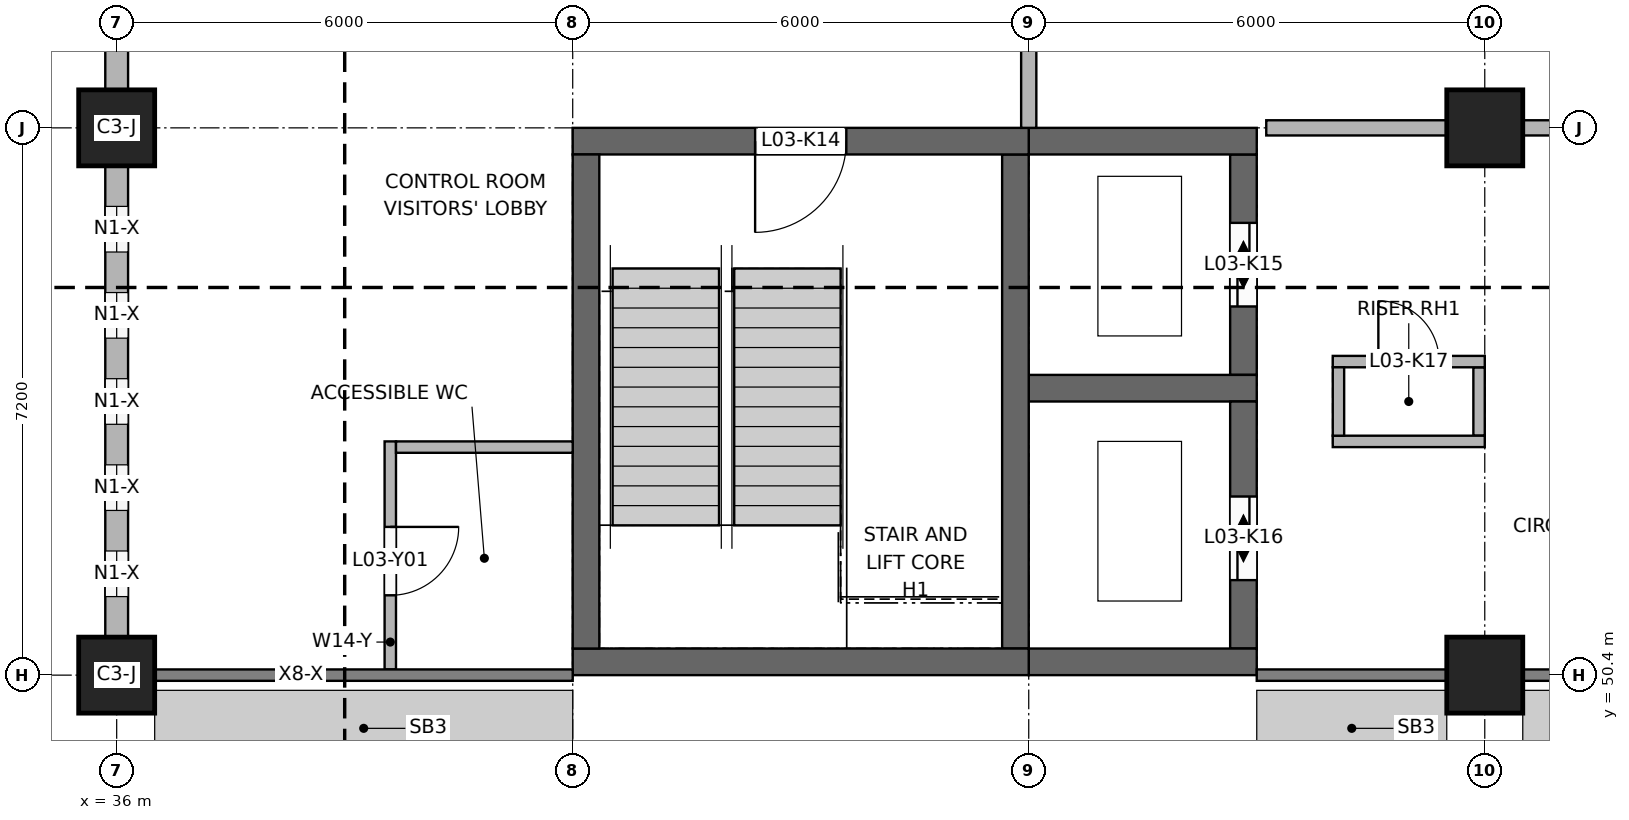
"""IFC4 building model, lengths in metres.
Left out: names, types, materials, properties, quantities, classifications, styles, units other than length and angle.
Written with IfcOpenShell. Run it as: python <this file> out.ifc"""

import sys

from ifc_helpers import new_model, si_unit, direction, frame, frame_2d, origin, origin_2d, place, context, subcontext, project, spatial, rectangle, extrude, element, fill, save


model = new_model("IFC4")
c1 = context("Model", 3, precision=1e-05, world=origin(), true_north=direction((0.0, 1.0)))
c2 = subcontext(c1, "Body", "Model", "MODEL_VIEW")
j1 = project(units=[si_unit("LENGTHUNIT", "METRE"), si_unit("PLANEANGLEUNIT", "RADIAN")], contexts=[c1])
p1 = place(None, origin())
s1 = spatial("IfcSite", under=j1, at=p1, CompositionType="ELEMENT")
p2 = place(p1, origin())
s2 = spatial("IfcBuilding", under=s1, at=p2, CompositionType="ELEMENT")
p3 = place(p2, frame((0.0, 0.0, 12.6)))
s3 = spatial("IfcBuildingStorey", under=s2, at=p3, CompositionType="ELEMENT", Elevation=12.6)
p4 = place(p3, frame((42.0, 50.575, 0.0), z_axis=(0.0, 0.0, 1.0), x_axis=(1.0, 0.0, 0.0)))
e1 = element("IfcWall", 1, at=p4, inside=s3, PredefinedType="SHEAR", context=c2, shape_type="SweptSolid", body=[
    extrude(rectangle(XDim=6.0, YDim=0.35, at=frame_2d((3.0, 0.0))), origin(), (0.0, 0.0, 1.0), 4.0),
])
p5 = place(p3, frame((42.0, 57.425, 0.0), z_axis=(0.0, 0.0, 1.0), x_axis=(1.0, 0.0, 0.0)))
e2 = element("IfcWall", 2, at=p5, inside=s3, PredefinedType="SHEAR", context=c2, shape_type="SweptSolid", body=[
    extrude(rectangle(XDim=6.0, YDim=0.35, at=frame_2d((3.0, 0.0))), origin(), (0.0, 0.0, 1.0), 4.0),
])
p6 = place(p5, frame((2.4, 0.0, 0.0)))
e3 = element("IfcOpeningElement", 3, at=p6, cuts=e2, PredefinedType="OPENING", context=c2, shape_type="SweptSolid", body=[
    extrude(rectangle(XDim=1.2, YDim=2.1, at=frame_2d((0.6, 1.05))), frame((0.0, 0.185, 0.0), z_axis=(0.0, -1.0, 0.0), x_axis=(1.0, 0.0, 0.0)), (0.0, 0.0, 1.0), 0.37),
])
for number, where, z_axis, x_axis in (
    (4, (42.175, 50.75, 0.0), (0.0, 0.0, 1.0), (0.0, 1.0, 0.0)),
    (5, (47.825, 50.75, 0.0), (0.0, 0.0, 1.0), (0.0, 1.0, 0.0)),
):
    element("IfcWall", number, at=place(p3, frame(where, z_axis=z_axis, x_axis=x_axis)), inside=s3, PredefinedType="SHEAR", context=c2, shape_type="SweptSolid", body=[
        extrude(rectangle(XDim=6.5, YDim=0.35, at=frame_2d((3.25, 0.0))), origin(), (0.0, 0.0, 1.0), 4.0),
    ])
for number, where, z_axis, x_axis in (
    (6, (48.0, 54.175, 0.0), (0.0, 0.0, 1.0), (1.0, 0.0, 0.0)),
    (7, (48.0, 57.425, 0.0), (0.0, 0.0, 1.0), (1.0, 0.0, 0.0)),
):
    element("IfcWall", number, at=place(p3, frame(where, z_axis=z_axis, x_axis=x_axis)), inside=s3, PredefinedType="SHEAR", context=c2, shape_type="SweptSolid", body=[
        extrude(rectangle(XDim=3.0, YDim=0.35, at=frame_2d((1.5, 0.0))), origin(), (0.0, 0.0, 1.0), 4.2),
    ])
p7 = place(p3, frame((50.825, 54.35, 0.0), z_axis=(0.0, 0.0, 1.0), x_axis=(0.0, 1.0, 0.0)))
e8 = element("IfcWall", 8, at=p7, inside=s3, PredefinedType="SHEAR", context=c2, shape_type="SweptSolid", body=[
    extrude(rectangle(XDim=2.9, YDim=0.35, at=frame_2d((1.45, 0.0))), origin(), (0.0, 0.0, 1.0), 4.2),
])
p8 = place(p7, frame((0.9, 0.0, 0.0)))
e9 = element("IfcOpeningElement", 9, at=p8, cuts=e8, PredefinedType="OPENING", context=c2, shape_type="SweptSolid", body=[
    extrude(rectangle(XDim=1.1, YDim=2.1, at=frame_2d((0.55, 1.05))), frame((0.0, 0.185, 0.0), z_axis=(0.0, -1.0, 0.0), x_axis=(1.0, 0.0, 0.0)), (0.0, 0.0, 1.0), 0.37),
])
p9 = place(p3, frame((48.0, 50.575, 0.0), z_axis=(0.0, 0.0, 1.0), x_axis=(1.0, 0.0, 0.0)))
e10 = element("IfcWall", 10, at=p9, inside=s3, PredefinedType="SHEAR", context=c2, shape_type="SweptSolid", body=[
    extrude(rectangle(XDim=3.0, YDim=0.35, at=frame_2d((1.5, 0.0))), origin(), (0.0, 0.0, 1.0), 4.2),
])
p10 = place(p3, frame((50.825, 50.75, 0.0), z_axis=(0.0, 0.0, 1.0), x_axis=(0.0, 1.0, 0.0)))
e11 = element("IfcWall", 11, at=p10, inside=s3, PredefinedType="SHEAR", context=c2, shape_type="SweptSolid", body=[
    extrude(rectangle(XDim=3.25, YDim=0.35, at=frame_2d((1.625, 0.0))), origin(), (0.0, 0.0, 1.0), 4.2),
])
p11 = place(p10, frame((0.9, 0.0, 0.0)))
e12 = element("IfcOpeningElement", 12, at=p11, cuts=e11, PredefinedType="OPENING", context=c2, shape_type="SweptSolid", body=[
    extrude(rectangle(XDim=1.1, YDim=2.1, at=frame_2d((0.55, 1.05))), frame((0.0, 0.185, 0.0), z_axis=(0.0, -1.0, 0.0), x_axis=(1.0, 0.0, 0.0)), (0.0, 0.0, 1.0), 0.37),
])
p12 = place(p3, frame((52.0, 53.475, 0.0), z_axis=(0.0, 0.0, 1.0), x_axis=(1.0, 0.0, 0.0)))
e13 = element("IfcWall", 13, at=p12, inside=s3, PredefinedType="SOLIDWALL", context=c2, shape_type="SweptSolid", body=[
    extrude(rectangle(XDim=2.0, YDim=0.15, at=frame_2d((1.0, 0.0))), origin(), (0.0, 0.0, 1.0), 4.2),
])
p13 = place(p3, frame((52.0, 54.525, 0.0), z_axis=(0.0, 0.0, 1.0), x_axis=(1.0, 0.0, 0.0)))
e14 = element("IfcWall", 14, at=p13, inside=s3, PredefinedType="SOLIDWALL", context=c2, shape_type="SweptSolid", body=[
    extrude(rectangle(XDim=2.0, YDim=0.15, at=frame_2d((1.0, 0.0))), origin(), (0.0, 0.0, 1.0), 4.2),
])
p14 = place(p13, frame((0.6, 0.0, 0.0)))
e15 = element("IfcOpeningElement", 15, at=p14, cuts=e14, PredefinedType="OPENING", context=c2, shape_type="SweptSolid", body=[
    extrude(rectangle(XDim=0.8, YDim=2.1, at=frame_2d((0.4, 1.05))), frame((0.0, 0.085, 0.0), z_axis=(0.0, -1.0, 0.0), x_axis=(1.0, 0.0, 0.0)), (0.0, 0.0, 1.0), 0.17),
])
p15 = place(p3, frame((52.075, 53.55, 0.0), z_axis=(0.0, 0.0, 1.0), x_axis=(0.0, 1.0, 0.0)))
e16 = element("IfcWall", 16, at=p15, inside=s3, PredefinedType="SOLIDWALL", context=c2, shape_type="SweptSolid", body=[
    extrude(rectangle(XDim=0.9, YDim=0.15, at=frame_2d((0.45, 0.0))), origin(), (0.0, 0.0, 1.0), 4.2),
])
p16 = place(p3, frame((53.925, 53.55, 0.0), z_axis=(0.0, 0.0, 1.0), x_axis=(0.0, 1.0, 0.0)))
e17 = element("IfcWall", 17, at=p16, inside=s3, PredefinedType="SOLIDWALL", context=c2, shape_type="SweptSolid", body=[
    extrude(rectangle(XDim=0.9, YDim=0.15, at=frame_2d((0.45, 0.0))), origin(), (0.0, 0.0, 1.0), 3.1),
])
for number, where, z_axis, x_axis in (
    (18, (36.0, 50.4, 0.0), (0.0, 0.0, 1.0), (1.0, 0.0, 0.0)),
    (19, (54.0, 50.4, 0.0), (0.0, 0.0, 1.0), (1.0, 0.0, 0.0)),
    (20, (36.0, 57.6, 0.0), (0.0, 0.0, 1.0), (1.0, 0.0, 0.0)),
    (21, (54.0, 57.6, 0.0), (0.0, 0.0, 1.0), (1.0, 0.0, 0.0)),
):
    element("IfcColumn", number, at=place(p3, frame(where, z_axis=z_axis, x_axis=x_axis)), inside=s3, PredefinedType="COLUMN", context=c2, shape_type="SweptSolid", body=[
        extrude(rectangle(XDim=1.0, YDim=1.0, at=origin_2d()), origin(), (0.0, 0.0, 1.0), 4.0),
    ])
p17 = place(p3, frame((36.0, 50.9, 0.0), z_axis=(0.0, 0.0, 1.0), x_axis=(0.0, 1.0, 0.0)))
e22 = element("IfcWall", 22, at=p17, inside=s3, PredefinedType="SOLIDWALL", context=c2, shape_type="SweptSolid", body=[
    extrude(rectangle(XDim=6.2, YDim=0.3, at=frame_2d((3.1, 0.0))), origin(), (0.0, 0.0, 1.0), 3.1),
])
p18 = place(p17, frame((0.533, 0.0, 0.9)))
e23 = element("IfcOpeningElement", 23, at=p18, cuts=e22, PredefinedType="OPENING", context=c2, shape_type="SweptSolid", body=[
    extrude(rectangle(XDim=0.6, YDim=1.9, at=frame_2d((0.3, 0.95))), frame((0.0, 0.16, 0.0), z_axis=(0.0, -1.0, 0.0), x_axis=(1.0, 0.0, 0.0)), (0.0, 0.0, 1.0), 0.32),
])
p19 = place(p17, frame((1.667, 0.0, 0.9)))
e24 = element("IfcOpeningElement", 24, at=p19, cuts=e22, PredefinedType="OPENING", context=c2, shape_type="SweptSolid", body=[
    extrude(rectangle(XDim=0.6, YDim=1.9, at=frame_2d((0.3, 0.95))), frame((0.0, 0.16, 0.0), z_axis=(0.0, -1.0, 0.0), x_axis=(1.0, 0.0, 0.0)), (0.0, 0.0, 1.0), 0.32),
])
p20 = place(p17, frame((2.8, 0.0, 0.9)))
e25 = element("IfcOpeningElement", 25, at=p20, cuts=e22, PredefinedType="OPENING", context=c2, shape_type="SweptSolid", body=[
    extrude(rectangle(XDim=0.6, YDim=1.9, at=frame_2d((0.3, 0.95))), frame((0.0, 0.16, 0.0), z_axis=(0.0, -1.0, 0.0), x_axis=(1.0, 0.0, 0.0)), (0.0, 0.0, 1.0), 0.32),
])
p21 = place(p17, frame((3.933, 0.0, 0.9)))
e26 = element("IfcOpeningElement", 26, at=p21, cuts=e22, PredefinedType="OPENING", context=c2, shape_type="SweptSolid", body=[
    extrude(rectangle(XDim=0.6, YDim=1.9, at=frame_2d((0.3, 0.95))), frame((0.0, 0.16, 0.0), z_axis=(0.0, -1.0, 0.0), x_axis=(1.0, 0.0, 0.0)), (0.0, 0.0, 1.0), 0.32),
])
p22 = place(p17, frame((5.067, 0.0, 0.9)))
e27 = element("IfcOpeningElement", 27, at=p22, cuts=e22, PredefinedType="OPENING", context=c2, shape_type="SweptSolid", body=[
    extrude(rectangle(XDim=0.6, YDim=1.9, at=frame_2d((0.3, 0.95))), frame((0.0, 0.16, 0.0), z_axis=(0.0, -1.0, 0.0), x_axis=(1.0, 0.0, 0.0)), (0.0, 0.0, 1.0), 0.32),
])
p23 = place(p3, frame((36.0, 58.1, 0.0), z_axis=(0.0, 0.0, 1.0), x_axis=(0.0, 1.0, 0.0)))
e28 = element("IfcWall", 28, at=p23, inside=s3, PredefinedType="SOLIDWALL", context=c2, shape_type="SweptSolid", body=[
    extrude(rectangle(XDim=6.2, YDim=0.3, at=frame_2d((3.1, 0.0))), origin(), (0.0, 0.0, 1.0), 3.1),
])
p24 = place(p23, frame((0.51, 0.0, 0.9)))
e29 = element("IfcOpeningElement", 29, at=p24, cuts=e28, PredefinedType="OPENING", context=c2, shape_type="SweptSolid", body=[
    extrude(rectangle(XDim=0.6, YDim=1.9, at=frame_2d((0.3, 0.95))), frame((0.0, 0.16, 0.0), z_axis=(0.0, -1.0, 0.0), x_axis=(1.0, 0.0, 0.0)), (0.0, 0.0, 1.0), 0.32),
])
p25 = place(p23, frame((2.735, 0.0, 0.9)))
e30 = element("IfcOpeningElement", 30, at=p25, cuts=e28, PredefinedType="OPENING", context=c2, shape_type="SweptSolid", body=[
    extrude(rectangle(XDim=0.6, YDim=1.9, at=frame_2d((0.3, 0.95))), frame((0.0, 0.16, 0.0), z_axis=(0.0, -1.0, 0.0), x_axis=(1.0, 0.0, 0.0)), (0.0, 0.0, 1.0), 0.32),
])
p26 = place(p23, frame((3.89, 0.0, 0.9)))
e31 = element("IfcOpeningElement", 31, at=p26, cuts=e28, PredefinedType="OPENING", context=c2, shape_type="SweptSolid", body=[
    extrude(rectangle(XDim=0.6, YDim=1.9, at=frame_2d((0.3, 0.95))), frame((0.0, 0.16, 0.0), z_axis=(0.0, -1.0, 0.0), x_axis=(1.0, 0.0, 0.0)), (0.0, 0.0, 1.0), 0.32),
])
p27 = place(p23, frame((5.045, 0.0, 0.9)))
e32 = element("IfcOpeningElement", 32, at=p27, cuts=e28, PredefinedType="OPENING", context=c2, shape_type="SweptSolid", body=[
    extrude(rectangle(XDim=0.6, YDim=1.9, at=frame_2d((0.3, 0.95))), frame((0.0, 0.16, 0.0), z_axis=(0.0, -1.0, 0.0), x_axis=(1.0, 0.0, 0.0)), (0.0, 0.0, 1.0), 0.32),
])
p28 = place(p3, frame((39.6, 50.475, 0.0), z_axis=(0.0, 0.0, 1.0), x_axis=(0.0, 1.0, 0.0)))
e33 = element("IfcWall", 33, at=p28, inside=s3, PredefinedType="PARTITIONING", context=c2, shape_type="SweptSolid", body=[
    extrude(rectangle(XDim=3.0, YDim=0.15, at=frame_2d((1.5, 0.0))), origin(), (0.0, 0.0, 1.0), 4.0),
])
p29 = place(p28, frame((0.975, 0.0, 0.0)))
e34 = element("IfcOpeningElement", 34, at=p29, cuts=e33, PredefinedType="OPENING", context=c2, shape_type="SweptSolid", body=[
    extrude(rectangle(XDim=0.9, YDim=2.1, at=frame_2d((0.45, 1.05))), frame((0.0, 0.085, 0.0), z_axis=(0.0, -1.0, 0.0), x_axis=(1.0, 0.0, 0.0)), (0.0, 0.0, 1.0), 0.17),
])
p30 = place(p3, frame((48.0, 57.6, 0.0), z_axis=(0.0, 0.0, 1.0), x_axis=(0.0, 1.0, 0.0)))
e35 = element("IfcWall", 35, at=p30, inside=s3, PredefinedType="PARTITIONING", context=c2, shape_type="SweptSolid", body=[
    extrude(rectangle(XDim=6.7, YDim=0.2, at=frame_2d((3.35, 0.0))), origin(), (0.0, 0.0, 1.0), 8.2),
])
p31 = place(p3, frame((39.675, 53.4, 0.0), z_axis=(0.0, 0.0, 1.0), x_axis=(1.0, 0.0, 0.0)))
e36 = element("IfcWall", 36, at=p31, inside=s3, PredefinedType="PARTITIONING", context=c2, shape_type="SweptSolid", body=[
    extrude(rectangle(XDim=2.325, YDim=0.15, at=frame_2d((1.163, 0.0))), origin(), (0.0, 0.0, 1.0), 4.0),
])
p32 = place(p3, frame((51.125, 57.6, 0.0), z_axis=(0.0, 0.0, 1.0), x_axis=(1.0, 0.0, 0.0)))
e37 = element("IfcWall", 37, at=p32, inside=s3, PredefinedType="PARTITIONING", context=c2, shape_type="SweptSolid", body=[
    extrude(rectangle(XDim=2.375, YDim=0.2, at=frame_2d((1.188, 0.0))), origin(), (0.0, 0.0, 1.0), 3.2),
])
p33 = place(p3, frame((54.5, 57.6, 0.0), z_axis=(0.0, 0.0, 1.0), x_axis=(1.0, 0.0, 0.0)))
e38 = element("IfcWall", 38, at=p33, inside=s3, PredefinedType="PARTITIONING", context=c2, shape_type="SweptSolid", body=[
    extrude(rectangle(XDim=5.0, YDim=0.2, at=frame_2d((2.5, 0.0))), origin(), (0.0, 0.0, 1.0), 3.2),
])
p34 = place(p33, frame((2.5, 0.0, 0.0)))
e39 = element("IfcOpeningElement", 39, at=p34, cuts=e38, PredefinedType="OPENING", context=c2, shape_type="SweptSolid", body=[
    extrude(rectangle(XDim=2.4, YDim=2.1, at=frame_2d((1.2, 1.05))), frame((0.0, 0.11, 0.0), z_axis=(0.0, -1.0, 0.0), x_axis=(1.0, 0.0, 0.0)), (0.0, 0.0, 1.0), 0.22),
])
p35 = place(p18, origin())
e40 = element("IfcWindow", 40, at=p35, inside=s3, PartitioningType="SINGLE_PANEL", PredefinedType="WINDOW", context=c2, shape_type="SweptSolid", body=[
    extrude(rectangle(XDim=0.6, YDim=1.9, at=frame_2d((0.3, 0.95))), frame((0.0, 0.03, 0.0), z_axis=(0.0, -1.0, 0.0), x_axis=(1.0, 0.0, 0.0)), (0.0, 0.0, 1.0), 0.06),
])
fill(e23, e40)
p36 = place(p19, origin())
e41 = element("IfcWindow", 41, at=p36, inside=s3, PartitioningType="SINGLE_PANEL", PredefinedType="WINDOW", context=c2, shape_type="SweptSolid", body=[
    extrude(rectangle(XDim=0.6, YDim=1.9, at=frame_2d((0.3, 0.95))), frame((0.0, 0.03, 0.0), z_axis=(0.0, -1.0, 0.0), x_axis=(1.0, 0.0, 0.0)), (0.0, 0.0, 1.0), 0.06),
])
fill(e24, e41)
p37 = place(p20, origin())
e42 = element("IfcWindow", 42, at=p37, inside=s3, PartitioningType="SINGLE_PANEL", PredefinedType="WINDOW", context=c2, shape_type="SweptSolid", body=[
    extrude(rectangle(XDim=0.6, YDim=1.9, at=frame_2d((0.3, 0.95))), frame((0.0, 0.03, 0.0), z_axis=(0.0, -1.0, 0.0), x_axis=(1.0, 0.0, 0.0)), (0.0, 0.0, 1.0), 0.06),
])
fill(e25, e42)
p38 = place(p21, origin())
e43 = element("IfcWindow", 43, at=p38, inside=s3, PartitioningType="SINGLE_PANEL", PredefinedType="WINDOW", context=c2, shape_type="SweptSolid", body=[
    extrude(rectangle(XDim=0.6, YDim=1.9, at=frame_2d((0.3, 0.95))), frame((0.0, 0.03, 0.0), z_axis=(0.0, -1.0, 0.0), x_axis=(1.0, 0.0, 0.0)), (0.0, 0.0, 1.0), 0.06),
])
fill(e26, e43)
p39 = place(p22, origin())
e44 = element("IfcWindow", 44, at=p39, inside=s3, PartitioningType="SINGLE_PANEL", PredefinedType="WINDOW", context=c2, shape_type="SweptSolid", body=[
    extrude(rectangle(XDim=0.6, YDim=1.9, at=frame_2d((0.3, 0.95))), frame((0.0, 0.03, 0.0), z_axis=(0.0, -1.0, 0.0), x_axis=(1.0, 0.0, 0.0)), (0.0, 0.0, 1.0), 0.06),
])
fill(e27, e44)
p40 = place(p6, frame((1.2, 0.0, 0.0), z_axis=(0.0, 0.0, 1.0), x_axis=(-1.0, 0.0, 0.0)))
e45 = element("IfcDoor", 45, at=p40, inside=s3, OperationType="SINGLE_SWING_RIGHT", PredefinedType="DOOR", context=c2, shape_type="SweptSolid", body=[
    extrude(rectangle(XDim=1.2, YDim=2.1, at=frame_2d((0.6, 1.05))), frame((0.0, 0.025, 0.0), z_axis=(0.0, -1.0, 0.0), x_axis=(1.0, 0.0, 0.0)), (0.0, 0.0, 1.0), 0.05),
])
fill(e3, e45)
p41 = place(p8, origin())
e46 = element("IfcDoor", 46, at=p41, inside=s3, OperationType="DOUBLE_DOOR_SLIDING", PredefinedType="DOOR", context=c2, shape_type="SweptSolid", body=[
    extrude(rectangle(XDim=1.1, YDim=2.1, at=frame_2d((0.55, 1.05))), frame((0.0, 0.025, 0.0), z_axis=(0.0, -1.0, 0.0), x_axis=(1.0, 0.0, 0.0)), (0.0, 0.0, 1.0), 0.05),
])
fill(e9, e46)
p42 = place(p11, origin())
e47 = element("IfcDoor", 47, at=p42, inside=s3, OperationType="DOUBLE_DOOR_SLIDING", PredefinedType="DOOR", context=c2, shape_type="SweptSolid", body=[
    extrude(rectangle(XDim=1.1, YDim=2.1, at=frame_2d((0.55, 1.05))), frame((0.0, 0.025, 0.0), z_axis=(0.0, -1.0, 0.0), x_axis=(1.0, 0.0, 0.0)), (0.0, 0.0, 1.0), 0.05),
])
fill(e12, e47)
p43 = place(p14, origin())
e48 = element("IfcDoor", 48, at=p43, inside=s3, OperationType="SINGLE_SWING_LEFT", PredefinedType="DOOR", context=c2, shape_type="SweptSolid", body=[
    extrude(rectangle(XDim=0.8, YDim=2.1, at=frame_2d((0.4, 1.05))), frame((0.0, 0.025, 0.0), z_axis=(0.0, -1.0, 0.0), x_axis=(1.0, 0.0, 0.0)), (0.0, 0.0, 1.0), 0.05),
])
fill(e15, e48)
p44 = place(p29, frame((0.9, 0.0, 0.0), z_axis=(0.0, 0.0, 1.0), x_axis=(-1.0, 0.0, 0.0)))
e49 = element("IfcDoor", 49, at=p44, inside=s3, OperationType="SINGLE_SWING_LEFT", PredefinedType="DOOR", context=c2, shape_type="SweptSolid", body=[
    extrude(rectangle(XDim=0.9, YDim=2.1, at=frame_2d((0.45, 1.05))), frame((0.0, 0.025, 0.0), z_axis=(0.0, -1.0, 0.0), x_axis=(1.0, 0.0, 0.0)), (0.0, 0.0, 1.0), 0.05),
])
fill(e34, e49)
save(model, sys.argv[1])
